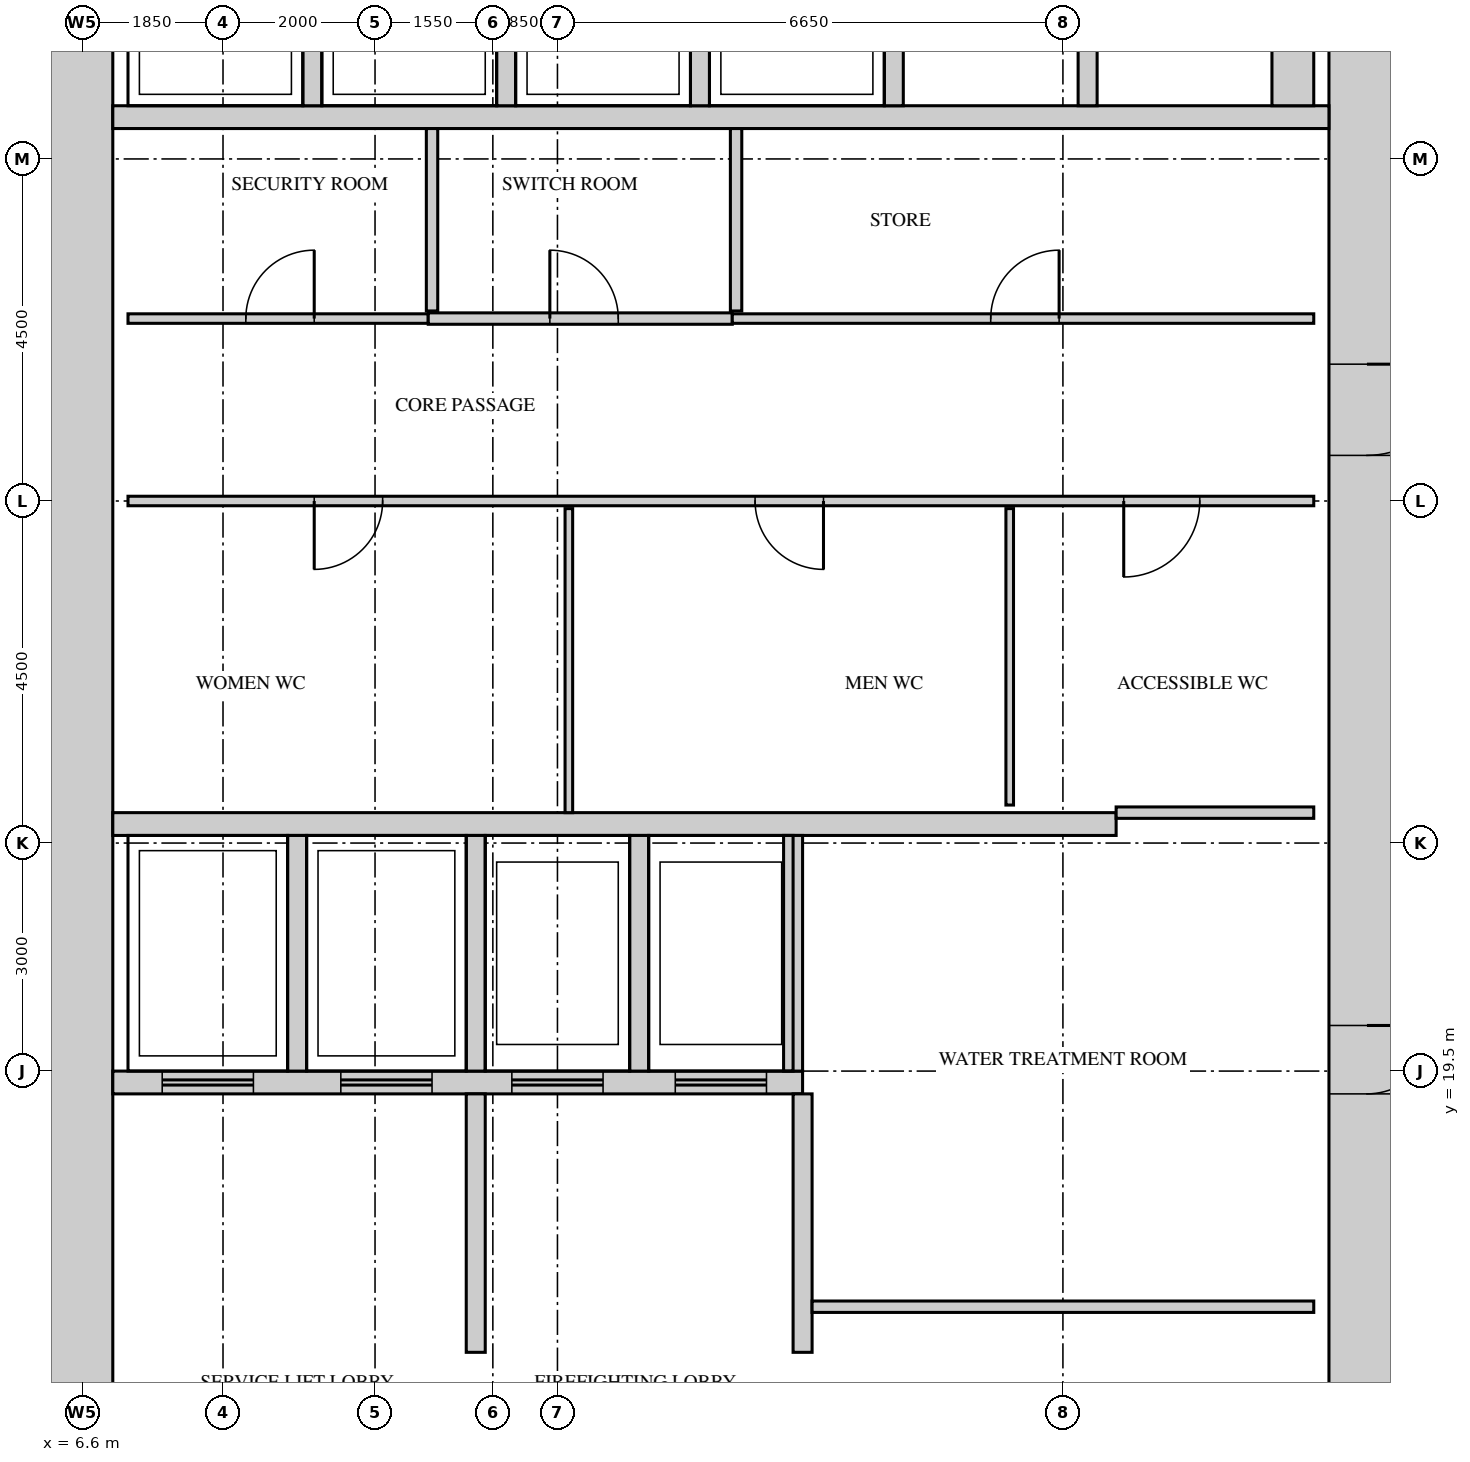
"""IFC4 building model, lengths in metres.
Left out: names, types, materials, properties, quantities, classifications, styles, units other than length and angle.
Written with IfcOpenShell. Run it as: python <this file> out.ifc"""

import sys

from ifc_helpers import new_model, si_unit, direction, frame, frame_2d, origin, place, context, subcontext, project, spatial, rectangle, extrude, source, transform, mapped, element, fill, save


model = new_model("IFC4")
c1 = context("Model", 3, precision=1e-05, world=origin(), true_north=direction((0.0, 1.0)))
c2 = subcontext(c1, "Body", "Model", "MODEL_VIEW")
j1 = project(units=[si_unit("LENGTHUNIT", "METRE"), si_unit("PLANEANGLEUNIT", "RADIAN")], contexts=[c1])
p1 = place(None, origin())
s1 = spatial("IfcSite", under=j1, at=p1, CompositionType="ELEMENT")
p2 = place(p1, origin())
s2 = spatial("IfcBuilding", under=s1, at=p2, CompositionType="ELEMENT")
p3 = place(p2, frame((0.0, 0.0, 154.3)))
s3 = spatial("IfcBuildingStorey", under=s2, at=p3, CompositionType="ELEMENT", Elevation=154.3)
m1 = source(origin(), c2, "Body", "SweptSolid", [
    extrude(rectangle(XDim=28.0, YDim=1.0, at=frame_2d((14.0, 0.0))), origin(), (0.0, 0.0, 1.0), 4.1),
])
p4 = place(p3, frame((23.5, 13.0, 0.0), z_axis=(0.0, 0.0, 1.0), x_axis=(0.0, 1.0, 0.0)))
e1 = element("IfcWall", 1, at=p4, inside=s3, PredefinedType="SHEAR", context=c2, shape_type="MappedRepresentation", body=[
    mapped(m1, transform((0.0, 0.0, 0.0))),
])
m2 = source(origin(), c2, "Body", "SweptSolid", [
    extrude(rectangle(XDim=1.8, YDim=2.1, at=frame_2d((0.9, 1.05))), frame((0.0, 0.51, 0.0), z_axis=(0.0, -1.0, 0.0), x_axis=(1.0, 0.0, 0.0)), (0.0, 0.0, 1.0), 1.02),
])
p5 = place(p4, frame((22.6, 0.0, 0.0)))
e2 = element("IfcOpeningElement", 2, at=p5, cuts=e1, PredefinedType="OPENING", context=c2, shape_type="MappedRepresentation", body=[
    mapped(m2, transform((0.0, 0.0, 0.0))),
])
m3 = source(origin(), c2, "Body", "SweptSolid", [
    extrude(rectangle(XDim=1.2, YDim=2.1, at=frame_2d((0.6, 1.05))), frame((0.0, 0.51, 0.0), z_axis=(0.0, -1.0, 0.0), x_axis=(1.0, 0.0, 0.0)), (0.0, 0.0, 1.0), 1.02),
])
p6 = place(p4, frame((14.6, 0.0, 0.0)))
e3 = element("IfcOpeningElement", 3, at=p6, cuts=e1, PredefinedType="OPENING", context=c2, shape_type="MappedRepresentation", body=[
    mapped(m3, transform((0.0, 0.0, 0.0))),
])
m4 = source(origin(), c2, "Body", "SweptSolid", [
    extrude(rectangle(XDim=0.9, YDim=2.1, at=frame_2d((0.45, 1.05))), frame((0.0, 0.51, 0.0), z_axis=(0.0, -1.0, 0.0), x_axis=(1.0, 0.0, 0.0)), (0.0, 0.0, 1.0), 1.02),
])
p7 = place(p4, frame((1.35, 0.0, 0.0)))
e4 = element("IfcOpeningElement", 4, at=p7, cuts=e1, PredefinedType="OPENING", context=c2, shape_type="MappedRepresentation", body=[
    mapped(m4, transform((0.0, 0.0, 0.0))),
])
p8 = place(p4, frame((6.2, 0.0, 0.0)))
e5 = element("IfcOpeningElement", 5, at=p8, cuts=e1, PredefinedType="OPENING", context=c2, shape_type="MappedRepresentation", body=[
    mapped(m4, transform((0.0, 0.0, 0.0))),
])
p9 = place(p3, frame((6.5, 13.0, 0.0), z_axis=(0.0, 0.0, 1.0), x_axis=(0.0, 1.0, 0.0)))
e6 = element("IfcWall", 6, at=p9, inside=s3, PredefinedType="SHEAR", context=c2, shape_type="MappedRepresentation", body=[
    mapped(m1, transform((0.0, 0.0, 0.0))),
])
m5 = source(origin(), c2, "Body", "SweptSolid", [
    extrude(rectangle(XDim=13.2, YDim=0.3, at=frame_2d((6.6, 0.0))), origin(), (0.0, 0.0, 1.0), 4.1),
])
p10 = place(p3, frame((7.0, 22.75, 0.0), z_axis=(0.0, 0.0, 1.0), x_axis=(1.0, 0.0, 0.0)))
e7 = element("IfcWall", 7, at=p10, inside=s3, PredefinedType="STANDARD", context=c2, shape_type="MappedRepresentation", body=[
    mapped(m5, transform((0.0, 0.0, 0.0))),
])
m6 = source(origin(), c2, "Body", "SweptSolid", [
    extrude(rectangle(XDim=9.075, YDim=0.3, at=frame_2d((4.538, 0.0))), origin(), (0.0, 0.0, 1.0), 4.1),
])
p11 = place(p3, frame((7.0, 19.35, 0.0), z_axis=(0.0, 0.0, 1.0), x_axis=(1.0, 0.0, 0.0)))
e8 = element("IfcWall", 8, at=p11, inside=s3, PredefinedType="STANDARD", context=c2, shape_type="MappedRepresentation", body=[
    mapped(m6, transform((0.0, 0.0, 0.0))),
])
m7 = source(origin(), c2, "Body", "SweptSolid", [
    extrude(rectangle(XDim=1.2, YDim=2.1, at=frame_2d((0.6, 1.05))), frame((0.0, 0.16, 0.0), z_axis=(0.0, -1.0, 0.0), x_axis=(1.0, 0.0, 0.0)), (0.0, 0.0, 1.0), 0.32),
])
p12 = place(p11, frame((0.65, 0.0, 0.0)))
e9 = element("IfcOpeningElement", 9, at=p12, cuts=e8, PredefinedType="OPENING", context=c2, shape_type="MappedRepresentation", body=[
    mapped(m7, transform((0.0, 0.0, 0.0))),
])
p13 = place(p11, frame((3.0, 0.0, 0.0)))
e10 = element("IfcOpeningElement", 10, at=p13, cuts=e8, PredefinedType="OPENING", context=c2, shape_type="MappedRepresentation", body=[
    mapped(m7, transform((0.0, 0.0, 0.0))),
])
p14 = place(p11, frame((5.25, 0.0, 0.0)))
e11 = element("IfcOpeningElement", 11, at=p14, cuts=e8, PredefinedType="OPENING", context=c2, shape_type="MappedRepresentation", body=[
    mapped(m7, transform((0.0, 0.0, 0.0))),
])
p15 = place(p11, frame((7.4, 0.0, 0.0)))
e12 = element("IfcOpeningElement", 12, at=p15, cuts=e8, PredefinedType="OPENING", context=c2, shape_type="MappedRepresentation", body=[
    mapped(m7, transform((0.0, 0.0, 0.0))),
])
m8 = source(origin(), c2, "Body", "SweptSolid", [
    extrude(rectangle(XDim=16.0, YDim=0.3, at=frame_2d((8.0, 0.0))), origin(), (0.0, 0.0, 1.0), 4.1),
])
p16 = place(p3, frame((7.0, 32.05, 0.0), z_axis=(0.0, 0.0, 1.0), x_axis=(1.0, 0.0, 0.0)))
e13 = element("IfcWall", 13, at=p16, inside=s3, PredefinedType="STANDARD", context=c2, shape_type="MappedRepresentation", body=[
    mapped(m8, transform((0.0, 0.0, 0.0))),
])
m9 = source(origin(), c2, "Body", "SweptSolid", [
    extrude(rectangle(XDim=3.1, YDim=0.25, at=frame_2d((1.55, 0.0))), origin(), (0.0, 0.0, 1.0), 4.1),
])
for number, where, z_axis, x_axis in (
    (14, (9.425, 19.5, 0.0), (0.0, 0.0, 1.0), (0.0, 1.0, 0.0)),
    (15, (11.775, 19.5, 0.0), (0.0, 0.0, 1.0), (0.0, 1.0, 0.0)),
    (16, (13.925, 19.5, 0.0), (0.0, 0.0, 1.0), (0.0, 1.0, 0.0)),
    (17, (15.95, 19.5, 0.0), (0.0, 0.0, 1.0), (0.0, 1.0, 0.0)),
):
    element("IfcWall", number, at=place(p3, frame(where, z_axis=z_axis, x_axis=x_axis)), inside=s3, PredefinedType="STANDARD", context=c2, shape_type="MappedRepresentation", body=[
        mapped(m9, transform((0.0, 0.0, 0.0))),
    ])
m10 = source(origin(), c2, "Body", "SweptSolid", [
    extrude(rectangle(XDim=2.4, YDim=0.25, at=frame_2d((1.2, 0.0))), origin(), (0.0, 0.0, 1.0), 4.1),
])
for number, where, z_axis, x_axis in (
    (18, (9.625, 32.2, 0.0), (0.0, 0.0, 1.0), (0.0, 1.0, 0.0)),
    (19, (12.175, 32.2, 0.0), (0.0, 0.0, 1.0), (0.0, 1.0, 0.0)),
    (20, (14.725, 32.2, 0.0), (0.0, 0.0, 1.0), (0.0, 1.0, 0.0)),
    (21, (17.275, 32.2, 0.0), (0.0, 0.0, 1.0), (0.0, 1.0, 0.0)),
    (22, (19.825, 32.2, 0.0), (0.0, 0.0, 1.0), (0.0, 1.0, 0.0)),
):
    element("IfcWall", number, at=place(p3, frame(where, z_axis=z_axis, x_axis=x_axis)), inside=s3, PredefinedType="STANDARD", context=c2, shape_type="MappedRepresentation", body=[
        mapped(m10, transform((0.0, 0.0, 0.0))),
    ])
m11 = source(origin(), c2, "Body", "SweptSolid", [
    extrude(rectangle(XDim=2.4, YDim=0.55, at=frame_2d((1.2, 0.0))), origin(), (0.0, 0.0, 1.0), 4.1),
])
p17 = place(p3, frame((22.525, 32.2, 0.0), z_axis=(0.0, 0.0, 1.0), x_axis=(0.0, 1.0, 0.0)))
e23 = element("IfcWall", 23, at=p17, inside=s3, PredefinedType="STANDARD", context=c2, shape_type="MappedRepresentation", body=[
    mapped(m11, transform((0.0, 0.0, 0.0))),
])
m12 = source(origin(), c2, "Body", "SweptSolid", [
    extrude(rectangle(XDim=3.4, YDim=0.25, at=frame_2d((1.7, 0.0))), origin(), (0.0, 0.0, 1.0), 4.1),
])
for number, where, z_axis, x_axis in (
    (24, (16.075, 15.8, 0.0), (0.0, 0.0, 1.0), (0.0, 1.0, 0.0)),
    (25, (11.775, 15.8, 0.0), (0.0, 0.0, 1.0), (0.0, 1.0, 0.0)),
):
    element("IfcWall", number, at=place(p3, frame(where, z_axis=z_axis, x_axis=x_axis)), inside=s3, PredefinedType="STANDARD", context=c2, shape_type="MappedRepresentation", body=[
        mapped(m12, transform((0.0, 0.0, 0.0))),
    ])
m13 = source(origin(), c2, "Body", "SweptSolid", [
    extrude(rectangle(XDim=6.6, YDim=0.15, at=frame_2d((3.3, 0.0))), origin(), (0.0, 0.0, 1.0), 4.2),
])
p18 = place(p3, frame((16.2, 16.4, 0.0), z_axis=(0.0, 0.0, 1.0), x_axis=(1.0, 0.0, 0.0)))
e26 = element("IfcWall", 26, at=p18, inside=s3, PredefinedType="PARTITIONING", context=c2, shape_type="MappedRepresentation", body=[
    mapped(m13, transform((0.0, 0.0, 0.0))),
])
m14 = source(origin(), c2, "Body", "SweptSolid", [
    extrude(rectangle(XDim=4.0, YDim=0.1, at=frame_2d((2.0, 0.0))), origin(), (0.0, 0.0, 1.0), 4.2),
])
p19 = place(p3, frame((13.0, 22.9, 0.0), z_axis=(0.0, 0.0, 1.0), x_axis=(0.0, 1.0, 0.0)))
e27 = element("IfcWall", 27, at=p19, inside=s3, PredefinedType="PARTITIONING", context=c2, shape_type="MappedRepresentation", body=[
    mapped(m14, transform((0.0, 0.0, 0.0))),
])
m15 = source(origin(), c2, "Body", "SweptSolid", [
    extrude(rectangle(XDim=2.6, YDim=0.15, at=frame_2d((1.3, 0.0))), origin(), (0.0, 0.0, 1.0), 4.2),
])
p20 = place(p3, frame((20.2, 22.9, 0.0), z_axis=(0.0, 0.0, 1.0), x_axis=(1.0, 0.0, 0.0)))
e28 = element("IfcWall", 28, at=p20, inside=s3, PredefinedType="PARTITIONING", context=c2, shape_type="MappedRepresentation", body=[
    mapped(m15, transform((0.0, 0.0, 0.0))),
])
m16 = source(origin(), c2, "Body", "SweptSolid", [
    extrude(rectangle(XDim=3.9, YDim=0.1, at=frame_2d((1.95, 0.0))), origin(), (0.0, 0.0, 1.0), 4.2),
])
p21 = place(p3, frame((18.8, 23.0, 0.0), z_axis=(0.0, 0.0, 1.0), x_axis=(0.0, 1.0, 0.0)))
e29 = element("IfcWall", 29, at=p21, inside=s3, PredefinedType="PARTITIONING", context=c2, shape_type="MappedRepresentation", body=[
    mapped(m16, transform((0.0, 0.0, 0.0))),
])
m17 = source(origin(), c2, "Body", "SweptSolid", [
    extrude(rectangle(XDim=15.6, YDim=0.125, at=frame_2d((7.8, 0.0))), origin(), (0.0, 0.0, 1.0), 4.2),
])
p22 = place(p3, frame((7.2, 27.0, 0.0), z_axis=(0.0, 0.0, 1.0), x_axis=(1.0, 0.0, 0.0)))
e30 = element("IfcWall", 30, at=p22, inside=s3, PredefinedType="PARTITIONING", context=c2, shape_type="MappedRepresentation", body=[
    mapped(m17, transform((0.0, 0.0, 0.0))),
])
m18 = source(origin(), c2, "Body", "SweptSolid", [
    extrude(rectangle(XDim=0.9, YDim=2.1, at=frame_2d((0.45, 1.05))), frame((0.0, 0.073, 0.0), z_axis=(0.0, -1.0, 0.0), x_axis=(1.0, 0.0, 0.0)), (0.0, 0.0, 1.0), 0.145),
])
p23 = place(p22, frame((2.45, 0.0, 0.0)))
e31 = element("IfcOpeningElement", 31, at=p23, cuts=e30, PredefinedType="OPENING", context=c2, shape_type="MappedRepresentation", body=[
    mapped(m18, transform((0.0, 0.0, 0.0))),
])
p24 = place(p22, frame((8.25, 0.0, 0.0)))
e32 = element("IfcOpeningElement", 32, at=p24, cuts=e30, PredefinedType="OPENING", context=c2, shape_type="MappedRepresentation", body=[
    mapped(m18, transform((0.0, 0.0, 0.0))),
])
m19 = source(origin(), c2, "Body", "SweptSolid", [
    extrude(rectangle(XDim=1.0, YDim=2.1, at=frame_2d((0.5, 1.05))), frame((0.0, 0.073, 0.0), z_axis=(0.0, -1.0, 0.0), x_axis=(1.0, 0.0, 0.0)), (0.0, 0.0, 1.0), 0.145),
])
p25 = place(p22, frame((13.1, 0.0, 0.0)))
e33 = element("IfcOpeningElement", 33, at=p25, cuts=e30, PredefinedType="OPENING", context=c2, shape_type="MappedRepresentation", body=[
    mapped(m19, transform((0.0, 0.0, 0.0))),
])
m20 = source(origin(), c2, "Body", "SweptSolid", [
    extrude(rectangle(XDim=3.95, YDim=0.125, at=frame_2d((1.975, 0.0))), origin(), (0.0, 0.0, 1.0), 4.2),
])
p26 = place(p3, frame((7.2, 29.4, 0.0), z_axis=(0.0, 0.0, 1.0), x_axis=(1.0, 0.0, 0.0)))
e34 = element("IfcWall", 34, at=p26, inside=s3, PredefinedType="PARTITIONING", context=c2, shape_type="MappedRepresentation", body=[
    mapped(m20, transform((0.0, 0.0, 0.0))),
])
p27 = place(p26, frame((1.55, 0.0, 0.0)))
e35 = element("IfcOpeningElement", 35, at=p27, cuts=e34, PredefinedType="OPENING", context=c2, shape_type="MappedRepresentation", body=[
    mapped(m18, transform((0.0, 0.0, 0.0))),
])
m21 = source(origin(), c2, "Body", "SweptSolid", [
    extrude(rectangle(XDim=4.0, YDim=0.15, at=frame_2d((2.0, 0.0))), origin(), (0.0, 0.0, 1.0), 4.2),
])
p28 = place(p3, frame((11.15, 29.4, 0.0), z_axis=(0.0, 0.0, 1.0), x_axis=(1.0, 0.0, 0.0)))
e36 = element("IfcWall", 36, at=p28, inside=s3, PredefinedType="PARTITIONING", context=c2, shape_type="MappedRepresentation", body=[
    mapped(m21, transform((0.0, 0.0, 0.0))),
])
m22 = source(origin(), c2, "Body", "SweptSolid", [
    extrude(rectangle(XDim=0.9, YDim=2.1, at=frame_2d((0.45, 1.05))), frame((0.0, 0.085, 0.0), z_axis=(0.0, -1.0, 0.0), x_axis=(1.0, 0.0, 0.0)), (0.0, 0.0, 1.0), 0.17),
])
p29 = place(p28, frame((1.6, 0.0, 0.0)))
e37 = element("IfcOpeningElement", 37, at=p29, cuts=e36, PredefinedType="OPENING", context=c2, shape_type="MappedRepresentation", body=[
    mapped(m22, transform((0.0, 0.0, 0.0))),
])
m23 = source(origin(), c2, "Body", "SweptSolid", [
    extrude(rectangle(XDim=7.65, YDim=0.125, at=frame_2d((3.825, 0.0))), origin(), (0.0, 0.0, 1.0), 4.2),
])
p30 = place(p3, frame((15.15, 29.4, 0.0), z_axis=(0.0, 0.0, 1.0), x_axis=(1.0, 0.0, 0.0)))
e38 = element("IfcWall", 38, at=p30, inside=s3, PredefinedType="PARTITIONING", context=c2, shape_type="MappedRepresentation", body=[
    mapped(m23, transform((0.0, 0.0, 0.0))),
])
p31 = place(p30, frame((3.4, 0.0, 0.0)))
e39 = element("IfcOpeningElement", 39, at=p31, cuts=e38, PredefinedType="OPENING", context=c2, shape_type="MappedRepresentation", body=[
    mapped(m18, transform((0.0, 0.0, 0.0))),
])
m24 = source(origin(), c2, "Body", "SweptSolid", [
    extrude(rectangle(XDim=2.4, YDim=0.15, at=frame_2d((1.2, 0.0))), origin(), (0.0, 0.0, 1.0), 4.2),
])
for number, where, z_axis, x_axis in (
    (40, (11.2, 29.5, 0.0), (0.0, 0.0, 1.0), (0.0, 1.0, 0.0)),
    (41, (15.2, 29.5, 0.0), (0.0, 0.0, 1.0), (0.0, 1.0, 0.0)),
):
    element("IfcWall", number, at=place(p3, frame(where, z_axis=z_axis, x_axis=x_axis)), inside=s3, PredefinedType="PARTITIONING", context=c2, shape_type="MappedRepresentation", body=[
        mapped(m24, transform((0.0, 0.0, 0.0))),
    ])
m25 = source(origin(), c2, "Body", "SweptSolid", [
    extrude(rectangle(XDim=1.2, YDim=2.1, at=frame_2d((0.6, 1.05))), frame((0.0, 0.45, 0.0), z_axis=(0.0, -1.0, 0.0), x_axis=(1.0, 0.0, 0.0)), (0.0, 0.0, 1.0), 0.9),
])
p32 = place(p6, origin())
e42 = element("IfcDoor", 42, at=p32, inside=s3, OperationType="SINGLE_SWING_RIGHT", PredefinedType="DOOR", context=c2, shape_type="MappedRepresentation", body=[
    mapped(m25, transform((0.0, 0.0, 0.0))),
])
fill(e3, e42)
m26 = source(origin(), c2, "Body", "SweptSolid", [
    extrude(rectangle(XDim=0.9, YDim=2.1, at=frame_2d((0.45, 1.05))), frame((0.0, 0.025, 0.0), z_axis=(0.0, -1.0, 0.0), x_axis=(1.0, 0.0, 0.0)), (0.0, 0.0, 1.0), 0.05),
])
p33 = place(p27, origin())
e43 = element("IfcDoor", 43, at=p33, inside=s3, OperationType="SINGLE_SWING_LEFT", PredefinedType="DOOR", context=c2, shape_type="MappedRepresentation", body=[
    mapped(m26, transform((0.0, 0.0, 0.0))),
])
fill(e35, e43)
p34 = place(p29, origin())
e44 = element("IfcDoor", 44, at=p34, inside=s3, OperationType="SINGLE_SWING_RIGHT", PredefinedType="DOOR", context=c2, shape_type="MappedRepresentation", body=[
    mapped(m26, transform((0.0, 0.0, 0.0))),
])
fill(e37, e44)
p35 = place(p31, origin())
e45 = element("IfcDoor", 45, at=p35, inside=s3, OperationType="SINGLE_SWING_LEFT", PredefinedType="DOOR", context=c2, shape_type="MappedRepresentation", body=[
    mapped(m26, transform((0.0, 0.0, 0.0))),
])
fill(e39, e45)
p36 = place(p23, origin())
e46 = element("IfcDoor", 46, at=p36, inside=s3, OperationType="SINGLE_SWING_LEFT", PredefinedType="DOOR", context=c2, shape_type="MappedRepresentation", body=[
    mapped(m26, transform((0.0, 0.0, 0.0))),
])
fill(e31, e46)
p37 = place(p24, origin())
e47 = element("IfcDoor", 47, at=p37, inside=s3, OperationType="SINGLE_SWING_RIGHT", PredefinedType="DOOR", context=c2, shape_type="MappedRepresentation", body=[
    mapped(m26, transform((0.0, 0.0, 0.0))),
])
fill(e32, e47)
m27 = source(origin(), c2, "Body", "SweptSolid", [
    extrude(rectangle(XDim=1.0, YDim=2.1, at=frame_2d((0.5, 1.05))), frame((0.0, 0.025, 0.0), z_axis=(0.0, -1.0, 0.0), x_axis=(1.0, 0.0, 0.0)), (0.0, 0.0, 1.0), 0.05),
])
p38 = place(p25, origin())
e48 = element("IfcDoor", 48, at=p38, inside=s3, OperationType="SINGLE_SWING_LEFT", PredefinedType="DOOR", context=c2, shape_type="MappedRepresentation", body=[
    mapped(m27, transform((0.0, 0.0, 0.0))),
])
fill(e33, e48)
m28 = source(origin(), c2, "Body", "SweptSolid", [
    extrude(rectangle(XDim=0.9, YDim=2.1, at=frame_2d((0.45, 1.05))), frame((0.0, 0.45, 0.0), z_axis=(0.0, -1.0, 0.0), x_axis=(1.0, 0.0, 0.0)), (0.0, 0.0, 1.0), 0.9),
])
p39 = place(p8, origin())
e49 = element("IfcDoor", 49, at=p39, inside=s3, OperationType="SINGLE_SWING_RIGHT", PredefinedType="DOOR", context=c2, shape_type="MappedRepresentation", body=[
    mapped(m28, transform((0.0, 0.0, 0.0))),
])
fill(e5, e49)
m29 = source(origin(), c2, "Body", "SweptSolid", [
    extrude(rectangle(XDim=1.2, YDim=2.1, at=frame_2d((0.6, 1.05))), frame((0.0, 0.025, 0.0), z_axis=(0.0, -1.0, 0.0), x_axis=(1.0, 0.0, 0.0)), (0.0, 0.0, 1.0), 0.05),
])
p40 = place(p12, origin())
e50 = element("IfcDoor", 50, at=p40, inside=s3, OperationType="DOUBLE_DOOR_SLIDING", PredefinedType="DOOR", context=c2, shape_type="MappedRepresentation", body=[
    mapped(m29, transform((0.0, 0.0, 0.0))),
])
fill(e9, e50)
p41 = place(p13, origin())
e51 = element("IfcDoor", 51, at=p41, inside=s3, OperationType="DOUBLE_DOOR_SLIDING", PredefinedType="DOOR", context=c2, shape_type="MappedRepresentation", body=[
    mapped(m29, transform((0.0, 0.0, 0.0))),
])
fill(e10, e51)
p42 = place(p14, origin())
e52 = element("IfcDoor", 52, at=p42, inside=s3, OperationType="DOUBLE_DOOR_SLIDING", PredefinedType="DOOR", context=c2, shape_type="MappedRepresentation", body=[
    mapped(m29, transform((0.0, 0.0, 0.0))),
])
fill(e11, e52)
p43 = place(p15, origin())
e53 = element("IfcDoor", 53, at=p43, inside=s3, OperationType="DOUBLE_DOOR_SLIDING", PredefinedType="DOOR", context=c2, shape_type="MappedRepresentation", body=[
    mapped(m29, transform((0.0, 0.0, 0.0))),
])
fill(e12, e53)
save(model, sys.argv[1])
